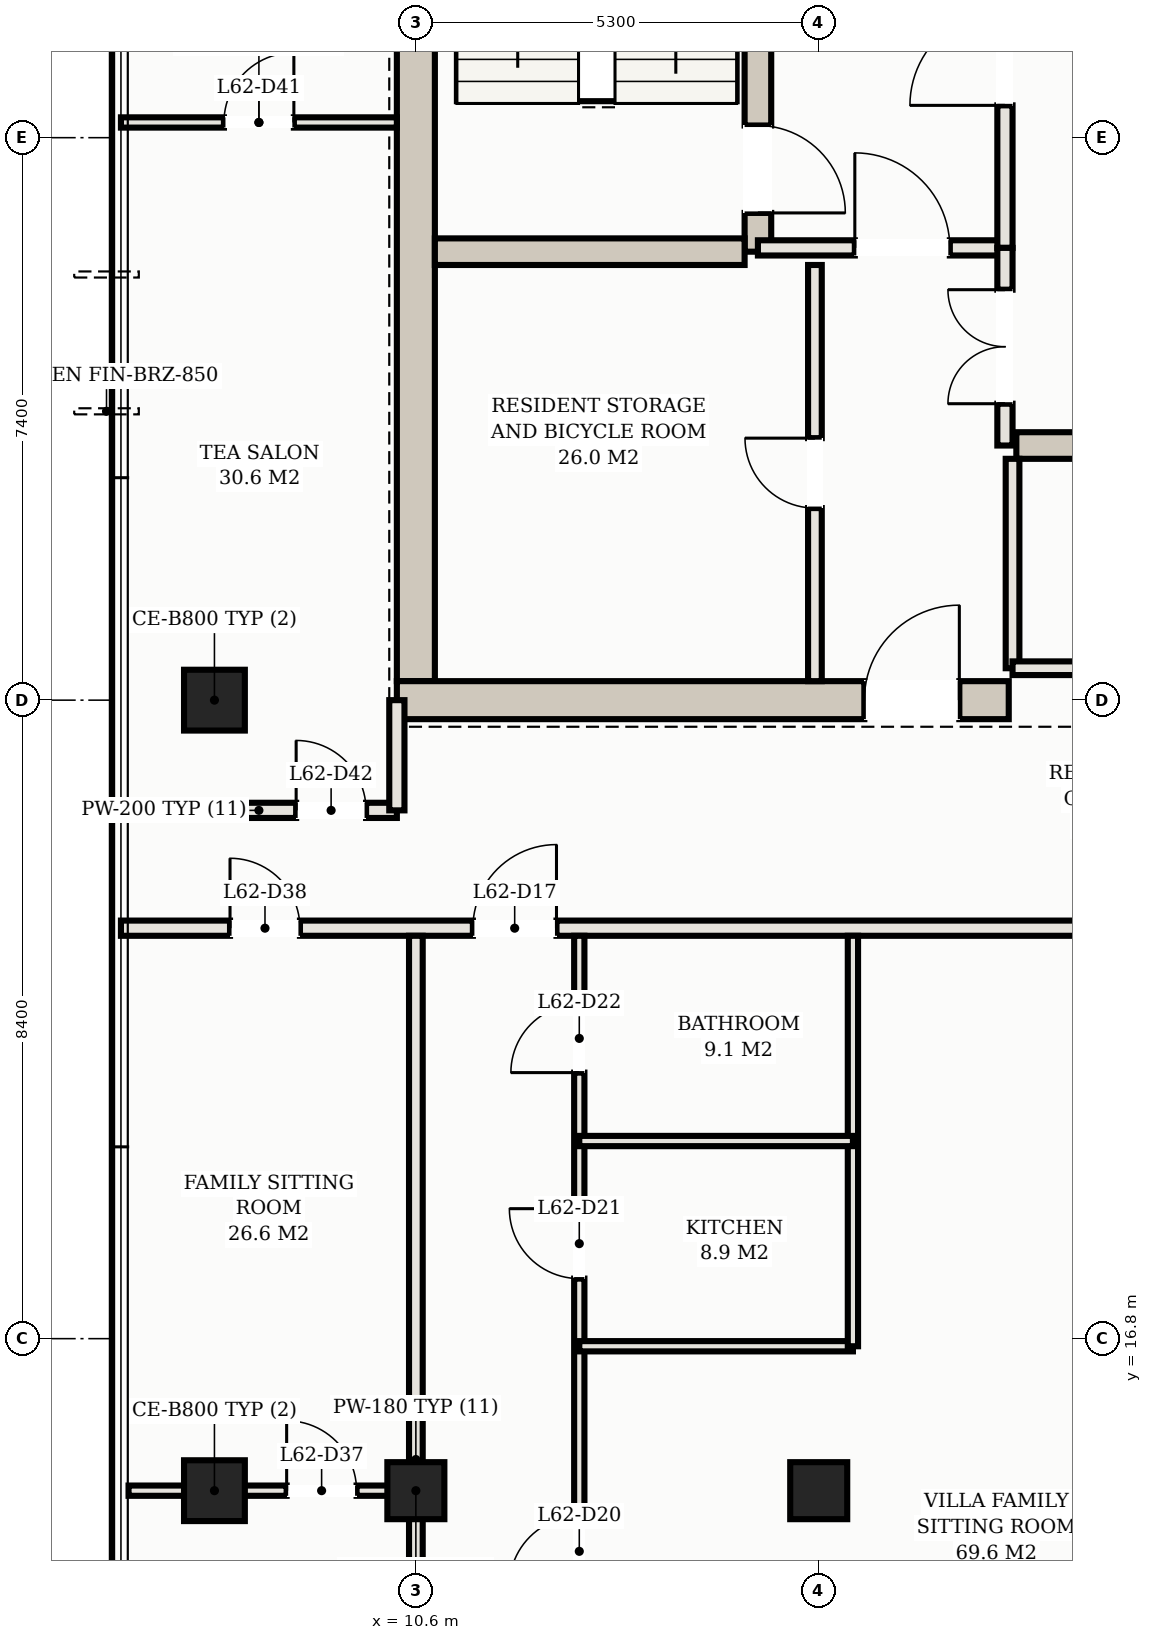
"""IFC4 building model, lengths in metres.
Left out: names, types, materials, properties, quantities, classifications, styles, units other than length and angle.
Written with IfcOpenShell. Run it as: python <this file> out.ifc"""

import sys

from ifc_helpers import new_model, si_unit, direction, frame, frame_2d, origin, origin_2d, place, context, subcontext, project, spatial, rectangle, hollow_rectangle, extrude, element, fill, save


model = new_model("IFC4")
c1 = context("Model", 3, precision=1e-05, world=origin(), true_north=direction((0.0, 1.0)))
c2 = subcontext(c1, "Body", "Model", "MODEL_VIEW")
j1 = project(units=[si_unit("LENGTHUNIT", "METRE"), si_unit("PLANEANGLEUNIT", "RADIAN")], contexts=[c1])
p1 = place(None, origin())
s1 = spatial("IfcSite", under=j1, at=p1, CompositionType="ELEMENT")
p2 = place(p1, origin())
s2 = spatial("IfcBuilding", under=s1, at=p2, CompositionType="ELEMENT")
p3 = place(p2, frame((0.0, 0.0, 226.4)))
s3 = spatial("IfcBuildingStorey", under=s2, at=p3, CompositionType="ELEMENT", Elevation=226.4)
p4 = place(p3, frame((10.6, 25.45, 0.0), z_axis=(0.0, 0.0, 1.0), x_axis=(0.0, 1.0, 0.0)))
e1 = element("IfcWall", 1, at=p4, inside=s3, PredefinedType="SHEAR", context=c2, shape_type="SweptSolid", body=[
    extrude(rectangle(XDim=14.3, YDim=0.5, at=frame_2d((7.15, 0.0))), origin(), (0.0, 0.0, 1.0), 3.11),
])
p5 = place(p3, frame((10.35, 25.2, 0.0), z_axis=(0.0, 0.0, 1.0), x_axis=(1.0, 0.0, 0.0)))
e2 = element("IfcWall", 2, at=p5, inside=s3, PredefinedType="SHEAR", context=c2, shape_type="SweptSolid", body=[
    extrude(rectangle(XDim=8.05, YDim=0.5, at=frame_2d((4.025, 0.0))), origin(), (0.0, 0.0, 1.0), 3.11),
])
p6 = place(p5, frame((6.15, 0.0, 0.0)))
e3 = element("IfcOpeningElement", 3, at=p6, cuts=e2, PredefinedType="OPENING", context=c2, shape_type="SweptSolid", body=[
    extrude(rectangle(XDim=1.25, YDim=2.2, at=frame_2d((0.625, 1.1))), frame((0.0, 0.26, 0.0), z_axis=(0.0, -1.0, 0.0), x_axis=(1.0, 0.0, 0.0)), (0.0, 0.0, 1.0), 0.52),
])
p7 = place(p3, frame((15.1, 31.1, 0.0), z_axis=(0.0, 0.0, 1.0), x_axis=(0.0, 1.0, 0.0)))
e4 = element("IfcWall", 4, at=p7, inside=s3, PredefinedType="SHEAR", context=c2, shape_type="SweptSolid", body=[
    extrude(rectangle(XDim=8.65, YDim=0.35, at=frame_2d((4.325, 0.0))), origin(), (0.0, 0.0, 1.0), 3.11),
])
p8 = place(p7, frame((0.51, 0.0, 0.0)))
e5 = element("IfcOpeningElement", 5, at=p8, cuts=e4, PredefinedType="OPENING", context=c2, shape_type="SweptSolid", body=[
    extrude(rectangle(XDim=1.15, YDim=2.2, at=frame_2d((0.575, 1.1))), frame((0.0, 0.185, 0.0), z_axis=(0.0, -1.0, 0.0), x_axis=(1.0, 0.0, 0.0)), (0.0, 0.0, 1.0), 0.37),
])
p9 = place(p3, frame((10.85, 31.1, 0.0), z_axis=(0.0, 0.0, 1.0), x_axis=(1.0, 0.0, 0.0)))
e6 = element("IfcWall", 6, at=p9, inside=s3, PredefinedType="SHEAR", context=c2, shape_type="SweptSolid", body=[
    extrude(rectangle(XDim=4.075, YDim=0.35, at=frame_2d((2.038, 0.0))), origin(), (0.0, 0.0, 1.0), 3.11),
])
p10 = place(p3, frame((18.5, 28.55, 0.0), z_axis=(0.0, 0.0, 1.0), x_axis=(1.0, 0.0, 0.0)))
e7 = element("IfcWall", 7, at=p10, inside=s3, PredefinedType="SHEAR", context=c2, shape_type="SweptSolid", body=[
    extrude(rectangle(XDim=16.0, YDim=0.35, at=frame_2d((8.0, 0.0))), origin(), (0.0, 0.0, 1.0), 3.11),
])
for number, where, z_axis, x_axis in (
    (8, (10.6, 14.8, 0.0), (0.0, 0.0, 1.0), (1.0, 0.0, 0.0)),
    (9, (15.9, 14.8, 0.0), (0.0, 0.0, 1.0), (1.0, 0.0, 0.0)),
):
    element("IfcColumn", number, at=place(p3, frame(where, z_axis=z_axis, x_axis=x_axis)), inside=s3, PredefinedType="COLUMN", context=c2, shape_type="SweptSolid", body=[
        extrude(hollow_rectangle(XDim=0.75, YDim=0.75, WallThickness=0.025, at=origin_2d()), origin(), (0.0, 0.0, 1.0), 3.3),
    ])
for number, where, z_axis, x_axis in (
    (10, (7.95, 14.8, 0.0), (0.0, 0.0, 1.0), (1.0, 0.0, 0.0)),
    (11, (7.95, 25.2, 0.0), (0.0, 0.0, 1.0), (1.0, 0.0, 0.0)),
):
    element("IfcColumn", number, at=place(p3, frame(where, z_axis=z_axis, x_axis=x_axis)), inside=s3, PredefinedType="COLUMN", context=c2, shape_type="SweptSolid", body=[
        extrude(hollow_rectangle(XDim=0.8, YDim=0.8, WallThickness=0.028, at=origin_2d()), origin(), (0.0, 0.0, 1.0), 3.3),
    ])
p11 = place(p3, frame((15.1, 31.15, 0.0), z_axis=(0.0, 0.0, 1.0), x_axis=(1.0, 0.0, 0.0)))
e12 = element("IfcWall", 12, at=p11, inside=s3, PredefinedType="PARTITIONING", context=c2, shape_type="SweptSolid", body=[
    extrude(rectangle(XDim=3.25, YDim=0.2, at=frame_2d((1.625, 0.0))), origin(), (0.0, 0.0, 1.0), 2.43),
])
p12 = place(p11, frame((1.275, 0.0, 0.0)))
e13 = element("IfcOpeningElement", 13, at=p12, cuts=e12, PredefinedType="OPENING", context=c2, shape_type="SweptSolid", body=[
    extrude(rectangle(XDim=1.25, YDim=2.2, at=frame_2d((0.625, 1.1))), frame((0.0, 0.11, 0.0), z_axis=(0.0, -1.0, 0.0), x_axis=(1.0, 0.0, 0.0)), (0.0, 0.0, 1.0), 0.22),
])
p13 = place(p3, frame((18.35, 31.15, 0.0), z_axis=(0.0, 0.0, 1.0), x_axis=(0.0, 1.0, 0.0)))
e14 = element("IfcWall", 14, at=p13, inside=s3, PredefinedType="PARTITIONING", context=c2, shape_type="SweptSolid", body=[
    extrude(rectangle(XDim=5.15, YDim=0.2, at=frame_2d((2.575, 0.0))), origin(), (0.0, 0.0, 1.0), 2.43),
])
p14 = place(p13, frame((1.875, 0.0, 0.0)))
e15 = element("IfcOpeningElement", 15, at=p14, cuts=e14, PredefinedType="OPENING", context=c2, shape_type="SweptSolid", body=[
    extrude(rectangle(XDim=1.25, YDim=2.2, at=frame_2d((0.625, 1.1))), frame((0.0, 0.11, 0.0), z_axis=(0.0, -1.0, 0.0), x_axis=(1.0, 0.0, 0.0)), (0.0, 0.0, 1.0), 0.22),
])
p15 = place(p3, frame((15.85, 25.45, 0.0), z_axis=(0.0, 0.0, 1.0), x_axis=(0.0, 1.0, 0.0)))
e16 = element("IfcWall", 16, at=p15, inside=s3, PredefinedType="PARTITIONING", context=c2, shape_type="SweptSolid", body=[
    extrude(rectangle(XDim=5.475, YDim=0.18, at=frame_2d((2.738, 0.0))), origin(), (0.0, 0.0, 1.0), 2.43),
])
p16 = place(p15, frame((2.277, 0.0, 0.0)))
e17 = element("IfcOpeningElement", 17, at=p16, cuts=e16, PredefinedType="OPENING", context=c2, shape_type="SweptSolid", body=[
    extrude(rectangle(XDim=0.92, YDim=2.15, at=frame_2d((0.46, 1.075))), frame((0.0, 0.1, 0.0), z_axis=(0.0, -1.0, 0.0), x_axis=(1.0, 0.0, 0.0)), (0.0, 0.0, 1.0), 0.2),
])
p17 = place(p3, frame((18.35, 28.55, 0.0), z_axis=(0.0, 0.0, 1.0), x_axis=(0.0, 1.0, 0.0)))
e18 = element("IfcWall", 18, at=p17, inside=s3, PredefinedType="PARTITIONING", context=c2, shape_type="SweptSolid", body=[
    extrude(rectangle(XDim=2.6, YDim=0.2, at=frame_2d((1.3, 0.0))), origin(), (0.0, 0.0, 1.0), 2.43),
])
p18 = place(p17, frame((0.55, 0.0, 0.0)))
e19 = element("IfcOpeningElement", 19, at=p18, cuts=e18, PredefinedType="OPENING", context=c2, shape_type="SweptSolid", body=[
    extrude(rectangle(XDim=1.5, YDim=2.25, at=frame_2d((0.75, 1.125))), frame((0.0, 0.11, 0.0), z_axis=(0.0, -1.0, 0.0), x_axis=(1.0, 0.0, 0.0)), (0.0, 0.0, 1.0), 0.22),
])
p19 = place(p3, frame((18.45, 25.62, 0.0), z_axis=(0.0, 0.0, 1.0), x_axis=(0.0, 1.0, 0.0)))
e20 = element("IfcWall", 20, at=p19, inside=s3, PredefinedType="PARTITIONING", context=c2, shape_type="SweptSolid", body=[
    extrude(rectangle(XDim=2.755, YDim=0.18, at=frame_2d((1.377, 0.0))), origin(), (0.0, 0.0, 1.0), 2.43),
])
p20 = place(p3, frame((18.45, 25.62, 0.0), z_axis=(0.0, 0.0, 1.0), x_axis=(1.0, 0.0, 0.0)))
e21 = element("IfcWall", 21, at=p20, inside=s3, PredefinedType="PARTITIONING", context=c2, shape_type="SweptSolid", body=[
    extrude(rectangle(XDim=7.9, YDim=0.18, at=frame_2d((3.95, 0.0))), origin(), (0.0, 0.0, 1.0), 2.43),
])
p21 = place(p20, frame((3.34, 0.0, 0.0)))
e22 = element("IfcOpeningElement", 22, at=p21, cuts=e21, PredefinedType="OPENING", context=c2, shape_type="SweptSolid", body=[
    extrude(rectangle(XDim=0.92, YDim=2.15, at=frame_2d((0.46, 1.075))), frame((0.0, 0.1, 0.0), z_axis=(0.0, -1.0, 0.0), x_axis=(1.0, 0.0, 0.0)), (0.0, 0.0, 1.0), 0.2),
])
p22 = place(p3, frame((6.72, 22.2, 0.0), z_axis=(0.0, 0.0, 1.0), x_axis=(1.0, 0.0, 0.0)))
e23 = element("IfcWall", 23, at=p22, inside=s3, PredefinedType="PARTITIONING", context=c2, shape_type="SweptSolid", body=[
    extrude(rectangle(XDim=39.56, YDim=0.2, at=frame_2d((19.78, 0.0))), origin(), (0.0, 0.0, 1.0), 2.43),
])
p23 = place(p22, frame((4.63, 0.0, 0.0)))
e24 = element("IfcOpeningElement", 24, at=p23, cuts=e23, PredefinedType="OPENING", context=c2, shape_type="SweptSolid", body=[
    extrude(rectangle(XDim=1.1, YDim=2.25, at=frame_2d((0.55, 1.125))), frame((0.0, 0.11, 0.0), z_axis=(0.0, -1.0, 0.0), x_axis=(1.0, 0.0, 0.0)), (0.0, 0.0, 1.0), 0.22),
])
p24 = place(p22, frame((20.53, 0.0, 0.0)))
e25 = element("IfcOpeningElement", 25, at=p24, cuts=e23, PredefinedType="OPENING", context=c2, shape_type="SweptSolid", body=[
    extrude(rectangle(XDim=1.1, YDim=2.25, at=frame_2d((0.55, 1.125))), frame((0.0, 0.11, 0.0), z_axis=(0.0, -1.0, 0.0), x_axis=(1.0, 0.0, 0.0)), (0.0, 0.0, 1.0), 0.22),
])
p25 = place(p22, frame((1.435, 0.0, 0.0)))
e26 = element("IfcOpeningElement", 26, at=p25, cuts=e23, PredefinedType="OPENING", context=c2, shape_type="SweptSolid", body=[
    extrude(rectangle(XDim=0.92, YDim=2.15, at=frame_2d((0.46, 1.075))), frame((0.0, 0.11, 0.0), z_axis=(0.0, -1.0, 0.0), x_axis=(1.0, 0.0, 0.0)), (0.0, 0.0, 1.0), 0.22),
])
p26 = place(p22, frame((37.205, 0.0, 0.0)))
e27 = element("IfcOpeningElement", 27, at=p26, cuts=e23, PredefinedType="OPENING", context=c2, shape_type="SweptSolid", body=[
    extrude(rectangle(XDim=0.92, YDim=2.15, at=frame_2d((0.46, 1.075))), frame((0.0, 0.11, 0.0), z_axis=(0.0, -1.0, 0.0), x_axis=(1.0, 0.0, 0.0)), (0.0, 0.0, 1.0), 0.22),
])
p27 = place(p3, frame((6.72, 23.75, 0.0), z_axis=(0.0, 0.0, 1.0), x_axis=(1.0, 0.0, 0.0)))
e28 = element("IfcWall", 28, at=p27, inside=s3, PredefinedType="PARTITIONING", context=c2, shape_type="SweptSolid", body=[
    extrude(rectangle(XDim=3.63, YDim=0.2, at=frame_2d((1.815, 0.0))), origin(), (0.0, 0.0, 1.0), 2.43),
])
p28 = place(p27, frame((2.305, 0.0, 0.0)))
e29 = element("IfcOpeningElement", 29, at=p28, cuts=e28, PredefinedType="OPENING", context=c2, shape_type="SweptSolid", body=[
    extrude(rectangle(XDim=0.92, YDim=2.15, at=frame_2d((0.46, 1.075))), frame((0.0, 0.11, 0.0), z_axis=(0.0, -1.0, 0.0), x_axis=(1.0, 0.0, 0.0)), (0.0, 0.0, 1.0), 0.22),
])
p29 = place(p3, frame((10.35, 23.75, 0.0), z_axis=(0.0, 0.0, 1.0), x_axis=(0.0, 1.0, 0.0)))
e30 = element("IfcWall", 30, at=p29, inside=s3, PredefinedType="PARTITIONING", context=c2, shape_type="SweptSolid", body=[
    extrude(rectangle(XDim=1.45, YDim=0.2, at=frame_2d((0.725, 0.0))), origin(), (0.0, 0.0, 1.0), 2.43),
])
p30 = place(p3, frame((10.6, 8.32, 0.0), z_axis=(0.0, 0.0, 1.0), x_axis=(0.0, 1.0, 0.0)))
e31 = element("IfcWall", 31, at=p30, inside=s3, PredefinedType="PARTITIONING", context=c2, shape_type="SweptSolid", body=[
    extrude(rectangle(XDim=13.78, YDim=0.18, at=frame_2d((6.89, 0.0))), origin(), (0.0, 0.0, 1.0), 2.43),
])
p31 = place(p3, frame((12.75, 11.303, 0.0), z_axis=(0.0, 0.0, 1.0), x_axis=(0.0, 1.0, 0.0)))
e32 = element("IfcWall", 32, at=p31, inside=s3, PredefinedType="PARTITIONING", context=c2, shape_type="SweptSolid", body=[
    extrude(rectangle(XDim=10.797, YDim=0.135, at=frame_2d((5.398, 0.0))), origin(), (0.0, 0.0, 1.0), 2.43),
])
p32 = place(p31, frame((2.239, 0.0, 0.0)))
e33 = element("IfcOpeningElement", 33, at=p32, cuts=e32, PredefinedType="OPENING", context=c2, shape_type="SweptSolid", body=[
    extrude(rectangle(XDim=0.92, YDim=2.15, at=frame_2d((0.46, 1.075))), frame((0.0, 0.078, 0.0), z_axis=(0.0, -1.0, 0.0), x_axis=(1.0, 0.0, 0.0)), (0.0, 0.0, 1.0), 0.155),
])
p33 = place(p31, frame((6.287, 0.0, 0.0)))
e34 = element("IfcOpeningElement", 34, at=p33, cuts=e32, PredefinedType="OPENING", context=c2, shape_type="SweptSolid", body=[
    extrude(rectangle(XDim=0.92, YDim=2.15, at=frame_2d((0.46, 1.075))), frame((0.0, 0.078, 0.0), z_axis=(0.0, -1.0, 0.0), x_axis=(1.0, 0.0, 0.0)), (0.0, 0.0, 1.0), 0.155),
])
p34 = place(p31, frame((8.997, 0.0, 0.0)))
e35 = element("IfcOpeningElement", 35, at=p34, cuts=e32, PredefinedType="OPENING", context=c2, shape_type="SweptSolid", body=[
    extrude(rectangle(XDim=0.9, YDim=2.15, at=frame_2d((0.45, 1.075))), frame((0.0, 0.078, 0.0), z_axis=(0.0, -1.0, 0.0), x_axis=(1.0, 0.0, 0.0)), (0.0, 0.0, 1.0), 0.155),
])
p35 = place(p3, frame((12.75, 16.7, 0.0), z_axis=(0.0, 0.0, 1.0), x_axis=(1.0, 0.0, 0.0)))
e36 = element("IfcWall", 36, at=p35, inside=s3, PredefinedType="PARTITIONING", context=c2, shape_type="SweptSolid", body=[
    extrude(rectangle(XDim=3.6, YDim=0.135, at=frame_2d((1.8, 0.0))), origin(), (0.0, 0.0, 1.0), 2.43),
])
p36 = place(p3, frame((16.35, 16.7, 0.0), z_axis=(0.0, 0.0, 1.0), x_axis=(0.0, 1.0, 0.0)))
e37 = element("IfcWall", 37, at=p36, inside=s3, PredefinedType="PARTITIONING", context=c2, shape_type="SweptSolid", body=[
    extrude(rectangle(XDim=5.4, YDim=0.135, at=frame_2d((2.7, 0.0))), origin(), (0.0, 0.0, 1.0), 2.43),
])
p37 = place(p3, frame((12.75, 19.4, 0.0), z_axis=(0.0, 0.0, 1.0), x_axis=(1.0, 0.0, 0.0)))
e38 = element("IfcWall", 38, at=p37, inside=s3, PredefinedType="PARTITIONING", context=c2, shape_type="SweptSolid", body=[
    extrude(rectangle(XDim=3.6, YDim=0.135, at=frame_2d((1.8, 0.0))), origin(), (0.0, 0.0, 1.0), 2.43),
])
p38 = place(p3, frame((6.82, 14.8, 0.0), z_axis=(0.0, 0.0, 1.0), x_axis=(1.0, 0.0, 0.0)))
e39 = element("IfcWall", 39, at=p38, inside=s3, PredefinedType="PARTITIONING", context=c2, shape_type="SweptSolid", body=[
    extrude(rectangle(XDim=3.78, YDim=0.135, at=frame_2d((1.89, 0.0))), origin(), (0.0, 0.0, 1.0), 2.43),
])
p39 = place(p38, frame((2.08, 0.0, 0.0)))
e40 = element("IfcOpeningElement", 40, at=p39, cuts=e39, PredefinedType="OPENING", context=c2, shape_type="SweptSolid", body=[
    extrude(rectangle(XDim=0.92, YDim=2.15, at=frame_2d((0.46, 1.075))), frame((0.0, 0.078, 0.0), z_axis=(0.0, -1.0, 0.0), x_axis=(1.0, 0.0, 0.0)), (0.0, 0.0, 1.0), 0.155),
])
p40 = place(p3, frame((6.72, 32.8, 0.0), z_axis=(0.0, 0.0, 1.0), x_axis=(1.0, 0.0, 0.0)))
e41 = element("IfcWall", 41, at=p40, inside=s3, PredefinedType="PARTITIONING", context=c2, shape_type="SweptSolid", body=[
    extrude(rectangle(XDim=3.63, YDim=0.135, at=frame_2d((1.815, 0.0))), origin(), (0.0, 0.0, 1.0), 2.43),
])
p41 = place(p40, frame((1.355, 0.0, 0.0)))
e42 = element("IfcOpeningElement", 42, at=p41, cuts=e41, PredefinedType="OPENING", context=c2, shape_type="SweptSolid", body=[
    extrude(rectangle(XDim=0.92, YDim=2.15, at=frame_2d((0.46, 1.075))), frame((0.0, 0.078, 0.0), z_axis=(0.0, -1.0, 0.0), x_axis=(1.0, 0.0, 0.0)), (0.0, 0.0, 1.0), 0.155),
])
p42 = place(p6, origin())
e43 = element("IfcDoor", 43, at=p42, inside=s3, OperationType="SINGLE_SWING_RIGHT", PredefinedType="DOOR", context=c2, shape_type="SweptSolid", body=[
    extrude(rectangle(XDim=1.25, YDim=2.2, at=frame_2d((0.625, 1.1))), frame((0.0, 0.025, 0.0), z_axis=(0.0, -1.0, 0.0), x_axis=(1.0, 0.0, 0.0)), (0.0, 0.0, 1.0), 0.05),
])
fill(e3, e43)
p43 = place(p12, origin())
e44 = element("IfcDoor", 44, at=p43, inside=s3, OperationType="SINGLE_SWING_LEFT", PredefinedType="DOOR", context=c2, shape_type="SweptSolid", body=[
    extrude(rectangle(XDim=1.25, YDim=2.2, at=frame_2d((0.625, 1.1))), frame((0.0, 0.025, 0.0), z_axis=(0.0, -1.0, 0.0), x_axis=(1.0, 0.0, 0.0)), (0.0, 0.0, 1.0), 0.05),
])
fill(e13, e44)
p44 = place(p14, origin())
e45 = element("IfcDoor", 45, at=p44, inside=s3, OperationType="SINGLE_SWING_LEFT", PredefinedType="DOOR", context=c2, shape_type="SweptSolid", body=[
    extrude(rectangle(XDim=1.25, YDim=2.2, at=frame_2d((0.625, 1.1))), frame((0.0, 0.025, 0.0), z_axis=(0.0, -1.0, 0.0), x_axis=(1.0, 0.0, 0.0)), (0.0, 0.0, 1.0), 0.05),
])
fill(e15, e45)
p45 = place(p8, frame((1.15, 0.0, 0.0), z_axis=(0.0, 0.0, 1.0), x_axis=(-1.0, 0.0, 0.0)))
e46 = element("IfcDoor", 46, at=p45, inside=s3, OperationType="SINGLE_SWING_RIGHT", PredefinedType="DOOR", context=c2, shape_type="SweptSolid", body=[
    extrude(rectangle(XDim=1.15, YDim=2.2, at=frame_2d((0.575, 1.1))), frame((0.0, 0.025, 0.0), z_axis=(0.0, -1.0, 0.0), x_axis=(1.0, 0.0, 0.0)), (0.0, 0.0, 1.0), 0.05),
])
fill(e5, e46)
p46 = place(p16, origin())
e47 = element("IfcDoor", 47, at=p46, inside=s3, OperationType="SINGLE_SWING_RIGHT", PredefinedType="DOOR", context=c2, shape_type="SweptSolid", body=[
    extrude(rectangle(XDim=0.92, YDim=2.15, at=frame_2d((0.46, 1.075))), frame((0.0, 0.025, 0.0), z_axis=(0.0, -1.0, 0.0), x_axis=(1.0, 0.0, 0.0)), (0.0, 0.0, 1.0), 0.05),
])
fill(e17, e47)
p47 = place(p18, origin())
e48 = element("IfcDoor", 48, at=p47, inside=s3, OperationType="DOUBLE_DOOR_SINGLE_SWING", PredefinedType="DOOR", context=c2, shape_type="SweptSolid", body=[
    extrude(rectangle(XDim=1.5, YDim=2.25, at=frame_2d((0.75, 1.125))), frame((0.0, 0.025, 0.0), z_axis=(0.0, -1.0, 0.0), x_axis=(1.0, 0.0, 0.0)), (0.0, 0.0, 1.0), 0.05),
])
fill(e19, e48)
p48 = place(p23, origin())
e49 = element("IfcDoor", 49, at=p48, inside=s3, OperationType="SINGLE_SWING_RIGHT", PredefinedType="DOOR", context=c2, shape_type="SweptSolid", body=[
    extrude(rectangle(XDim=1.1, YDim=2.25, at=frame_2d((0.55, 1.125))), frame((0.0, 0.025, 0.0), z_axis=(0.0, -1.0, 0.0), x_axis=(1.0, 0.0, 0.0)), (0.0, 0.0, 1.0), 0.05),
])
fill(e24, e49)
p49 = place(p32, origin())
e50 = element("IfcDoor", 50, at=p49, inside=s3, OperationType="SINGLE_SWING_LEFT", PredefinedType="DOOR", context=c2, shape_type="SweptSolid", body=[
    extrude(rectangle(XDim=0.92, YDim=2.15, at=frame_2d((0.46, 1.075))), frame((0.0, 0.025, 0.0), z_axis=(0.0, -1.0, 0.0), x_axis=(1.0, 0.0, 0.0)), (0.0, 0.0, 1.0), 0.05),
])
fill(e33, e50)
p50 = place(p33, origin())
e51 = element("IfcDoor", 51, at=p50, inside=s3, OperationType="SINGLE_SWING_RIGHT", PredefinedType="DOOR", context=c2, shape_type="SweptSolid", body=[
    extrude(rectangle(XDim=0.92, YDim=2.15, at=frame_2d((0.46, 1.075))), frame((0.0, 0.025, 0.0), z_axis=(0.0, -1.0, 0.0), x_axis=(1.0, 0.0, 0.0)), (0.0, 0.0, 1.0), 0.05),
])
fill(e34, e51)
p51 = place(p34, origin())
e52 = element("IfcDoor", 52, at=p51, inside=s3, OperationType="SINGLE_SWING_LEFT", PredefinedType="DOOR", context=c2, shape_type="SweptSolid", body=[
    extrude(rectangle(XDim=0.9, YDim=2.15, at=frame_2d((0.45, 1.075))), frame((0.0, 0.025, 0.0), z_axis=(0.0, -1.0, 0.0), x_axis=(1.0, 0.0, 0.0)), (0.0, 0.0, 1.0), 0.05),
])
fill(e35, e52)
p52 = place(p39, origin())
e53 = element("IfcDoor", 53, at=p52, inside=s3, OperationType="SINGLE_SWING_LEFT", PredefinedType="DOOR", context=c2, shape_type="SweptSolid", body=[
    extrude(rectangle(XDim=0.92, YDim=2.15, at=frame_2d((0.46, 1.075))), frame((0.0, 0.025, 0.0), z_axis=(0.0, -1.0, 0.0), x_axis=(1.0, 0.0, 0.0)), (0.0, 0.0, 1.0), 0.05),
])
fill(e40, e53)
p53 = place(p25, origin())
e54 = element("IfcDoor", 54, at=p53, inside=s3, OperationType="SINGLE_SWING_LEFT", PredefinedType="DOOR", context=c2, shape_type="SweptSolid", body=[
    extrude(rectangle(XDim=0.92, YDim=2.15, at=frame_2d((0.46, 1.075))), frame((0.0, 0.025, 0.0), z_axis=(0.0, -1.0, 0.0), x_axis=(1.0, 0.0, 0.0)), (0.0, 0.0, 1.0), 0.05),
])
fill(e26, e54)
p54 = place(p41, origin())
e55 = element("IfcDoor", 55, at=p54, inside=s3, OperationType="SINGLE_SWING_RIGHT", PredefinedType="DOOR", context=c2, shape_type="SweptSolid", body=[
    extrude(rectangle(XDim=0.92, YDim=2.15, at=frame_2d((0.46, 1.075))), frame((0.0, 0.025, 0.0), z_axis=(0.0, -1.0, 0.0), x_axis=(1.0, 0.0, 0.0)), (0.0, 0.0, 1.0), 0.05),
])
fill(e42, e55)
p55 = place(p28, origin())
e56 = element("IfcDoor", 56, at=p55, inside=s3, OperationType="SINGLE_SWING_LEFT", PredefinedType="DOOR", context=c2, shape_type="SweptSolid", body=[
    extrude(rectangle(XDim=0.92, YDim=2.15, at=frame_2d((0.46, 1.075))), frame((0.0, 0.025, 0.0), z_axis=(0.0, -1.0, 0.0), x_axis=(1.0, 0.0, 0.0)), (0.0, 0.0, 1.0), 0.05),
])
fill(e29, e56)
save(model, sys.argv[1])
